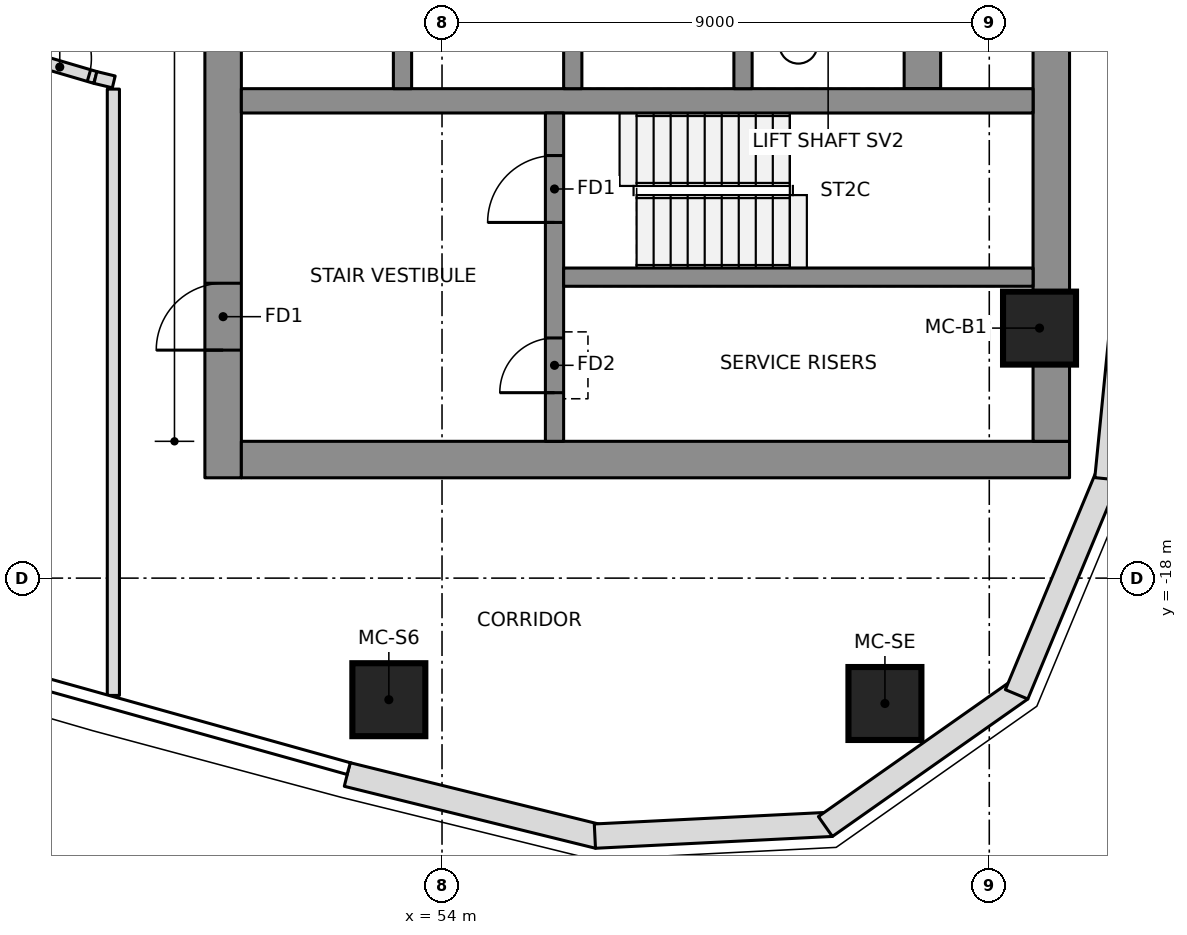
"""IFC4 building model, lengths in metres.
Left out: names, types, materials, properties, quantities, classifications, styles, units other than length and angle.
Written with IfcOpenShell. Run it as: python <this file> out.ifc"""

import sys

from ifc_helpers import new_model, si_unit, direction, frame, frame_2d, origin, origin_2d, place, context, subcontext, project, spatial, polyline, rectangle, outline, extrude, element, fill, save


model = new_model("IFC4")
c1 = context("Model", 3, precision=1e-05, world=origin(), true_north=direction((0.0, 1.0)))
c2 = subcontext(c1, "Body", "Model", "MODEL_VIEW")
j1 = project(units=[si_unit("LENGTHUNIT", "METRE"), si_unit("PLANEANGLEUNIT", "RADIAN")], contexts=[c1])
p1 = place(None, origin())
s1 = spatial("IfcSite", under=j1, at=p1, CompositionType="ELEMENT")
p2 = place(p1, origin())
s2 = spatial("IfcBuilding", under=s1, at=p2, CompositionType="ELEMENT")
p3 = place(p2, frame((0.0, 0.0, 224.35)))
s3 = spatial("IfcBuildingStorey", under=s2, at=p3, CompositionType="ELEMENT", Elevation=224.35)
p4 = place(p3, frame((50.4, -16.35, 0.0), z_axis=(0.0, 0.0, 1.0), x_axis=(0.0, 1.0, 0.0)))
e1 = element("IfcWall", 1, at=p4, inside=s3, PredefinedType="SHEAR", context=c2, shape_type="SweptSolid", body=[
    extrude(rectangle(XDim=9.7, YDim=0.6, at=frame_2d((4.85, 0.0))), origin(), (0.0, 0.0, 1.0), 3.55),
])
p5 = place(p4, frame((2.1, 0.0, 0.0)))
e2 = element("IfcOpeningElement", 2, at=p5, cuts=e1, PredefinedType="OPENING", context=c2, shape_type="SweptSolid", body=[
    extrude(rectangle(XDim=1.1, YDim=2.1, at=frame_2d((0.55, 1.05))), frame((0.0, 0.31, 0.0), z_axis=(0.0, -1.0, 0.0), x_axis=(1.0, 0.0, 0.0)), (0.0, 0.0, 1.0), 0.62),
])
p6 = place(p3, frame((50.7, -16.05, 0.0), z_axis=(0.0, 0.0, 1.0), x_axis=(1.0, 0.0, 0.0)))
e3 = element("IfcWall", 3, at=p6, inside=s3, PredefinedType="SHEAR", context=c2, shape_type="SweptSolid", body=[
    extrude(rectangle(XDim=13.62, YDim=0.6, at=frame_2d((6.81, 0.0))), origin(), (0.0, 0.0, 1.0), 3.55),
])
p7 = place(p3, frame((64.02, -15.75, 0.0), z_axis=(0.0, 0.0, 1.0), x_axis=(0.0, 1.0, 0.0)))
e4 = element("IfcWall", 4, at=p7, inside=s3, PredefinedType="SHEAR", context=c2, shape_type="SweptSolid", body=[
    extrude(rectangle(XDim=8.248, YDim=0.6, at=frame_2d((4.124, 0.0))), origin(), (0.0, 0.0, 1.0), 3.55),
])
p8 = place(p3, frame((61.9, -9.95, 0.0), z_axis=(0.0, 0.0, 1.0), x_axis=(0.0, 1.0, 0.0)))
e5 = element("IfcWall", 5, at=p8, inside=s3, PredefinedType="SHEAR", context=c2, shape_type="SweptSolid", body=[
    extrude(rectangle(XDim=19.9, YDim=0.6, at=frame_2d((9.95, 0.0))), origin(), (0.0, 0.0, 1.0), 3.55),
])
p9 = place(p3, frame((50.7, -10.15, 0.0), z_axis=(0.0, 0.0, 1.0), x_axis=(1.0, 0.0, 0.0)))
e6 = element("IfcWall", 6, at=p9, inside=s3, PredefinedType="SHEAR", context=c2, shape_type="SweptSolid", body=[
    extrude(rectangle(XDim=13.02, YDim=0.4, at=frame_2d((6.51, 0.0))), origin(), (0.0, 0.0, 1.0), 3.55),
])
for number, where, z_axis, x_axis in (
    (7, (53.35, -9.95, 0.0), (0.0, 0.0, 1.0), (0.0, 1.0, 0.0)),
    (8, (56.15, -9.95, 0.0), (0.0, 0.0, 1.0), (0.0, 1.0, 0.0)),
    (9, (58.95, -9.95, 0.0), (0.0, 0.0, 1.0), (0.0, 1.0, 0.0)),
):
    element("IfcWall", number, at=place(p3, frame(where, z_axis=z_axis, x_axis=x_axis)), inside=s3, PredefinedType="SHEAR", context=c2, shape_type="SweptSolid", body=[
        extrude(rectangle(XDim=3.0, YDim=0.3, at=frame_2d((1.5, 0.0))), origin(), (0.0, 0.0, 1.0), 3.55),
    ])
p10 = place(p3, frame((55.85, -15.75, 0.0), z_axis=(0.0, 0.0, 1.0), x_axis=(0.0, 1.0, 0.0)))
e10 = element("IfcWall", 10, at=p10, inside=s3, PredefinedType="SHEAR", context=c2, shape_type="SweptSolid", body=[
    extrude(rectangle(XDim=5.4, YDim=0.3, at=frame_2d((2.7, 0.0))), origin(), (0.0, 0.0, 1.0), 3.55),
])
p11 = place(p10, frame((3.6, 0.0, 0.0)))
e11 = element("IfcOpeningElement", 11, at=p11, cuts=e10, PredefinedType="OPENING", context=c2, shape_type="SweptSolid", body=[
    extrude(rectangle(XDim=1.1, YDim=2.1, at=frame_2d((0.55, 1.05))), frame((0.0, 0.16, 0.0), z_axis=(0.0, -1.0, 0.0), x_axis=(1.0, 0.0, 0.0)), (0.0, 0.0, 1.0), 0.32),
])
p12 = place(p10, frame((0.8, 0.0, 0.0)))
e12 = element("IfcOpeningElement", 12, at=p12, cuts=e10, PredefinedType="OPENING", context=c2, shape_type="SweptSolid", body=[
    extrude(rectangle(XDim=0.9, YDim=2.1, at=frame_2d((0.45, 1.05))), frame((0.0, 0.16, 0.0), z_axis=(0.0, -1.0, 0.0), x_axis=(1.0, 0.0, 0.0)), (0.0, 0.0, 1.0), 0.32),
])
p13 = place(p3, frame((56.0, -13.05, 0.0), z_axis=(0.0, 0.0, 1.0), x_axis=(1.0, 0.0, 0.0)))
e13 = element("IfcWall", 13, at=p13, inside=s3, PredefinedType="SHEAR", context=c2, shape_type="SweptSolid", body=[
    extrude(rectangle(XDim=7.72, YDim=0.3, at=frame_2d((3.86, 0.0))), origin(), (0.0, 0.0, 1.0), 3.55),
])
for number, where, z_axis, x_axis in (
    (14, (53.125, -20.0, 0.0), (0.0, 0.0, 1.0), (1.0, 0.0, 0.0)),
    (15, (61.284, -20.062, 0.0), (0.0, 0.0, 1.0), (1.0, 0.0, 0.0)),
    (16, (63.826, -13.888, 0.0), (0.0, 0.0, 1.0), (1.0, 0.0, 0.0)),
):
    element("IfcColumn", number, at=place(p3, frame(where, z_axis=z_axis, x_axis=x_axis)), inside=s3, PredefinedType="COLUMN", context=c2, shape_type="SweptSolid", body=[
        extrude(rectangle(XDim=1.2, YDim=1.2, at=origin_2d()), origin(), (0.0, 0.0, 1.0), 3.55),
    ])
p14 = place(p3, frame((52.441, -21.23, 0.0), z_axis=(0.0, 0.0, 1.0), x_axis=(0.970902342456, -0.23947576373, 0.0)))
e17 = element("IfcWall", 17, at=p14, inside=s3, PredefinedType="NOTDEFINED", context=c2, shape_type="SweptSolid", body=[
    extrude(outline(polyline([(0.0, -0.2), (4.255, -0.2), (4.197, 0.2), (0.0, 0.2), (0.0, -0.2)])), origin(), (0.0, 0.0, 1.0), 3.25),
])
p15 = place(p3, frame((56.543, -22.242, 0.0), z_axis=(0.0, 0.0, 1.0), x_axis=(0.998758875872, 0.049806705046, 0.0)))
e18 = element("IfcWall", 18, at=p15, inside=s3, PredefinedType="NOTDEFINED", context=c2, shape_type="SweptSolid", body=[
    extrude(outline(polyline([(-0.029, -0.2), (3.871, -0.2), (3.756, 0.2), (0.029, 0.2), (-0.029, -0.2)])), origin(), (0.0, 0.0, 1.0), 3.25),
])
p16 = place(p3, frame((60.352, -22.052, 0.0), z_axis=(0.0, 0.0, 1.0), x_axis=(0.817942545532, 0.575299915009, 0.0)))
e19 = element("IfcWall", 19, at=p16, inside=s3, PredefinedType="NOTDEFINED", context=c2, shape_type="SweptSolid", body=[
    extrude(outline(polyline([(-0.058, -0.2), (3.871, -0.2), (3.756, 0.2), (0.058, 0.2), (-0.058, -0.2)])), origin(), (0.0, 0.0, 1.0), 3.25),
])
p17 = place(p3, frame((63.471, -19.858, 0.0), z_axis=(0.0, 0.0, 1.0), x_axis=(0.3844335483, 0.923152667191, 0.0)))
e20 = element("IfcWall", 20, at=p17, inside=s3, PredefinedType="NOTDEFINED", context=c2, shape_type="SweptSolid", body=[
    extrude(outline(polyline([(-0.058, -0.2), (3.843, -0.2), (3.784, 0.2), (0.058, 0.2), (-0.058, -0.2)])), origin(), (0.0, 0.0, 1.0), 3.25),
])
p18 = place(p3, frame((64.938, -16.337, 0.0), z_axis=(0.0, 0.0, 1.0), x_axis=(0.098718218066, 0.995115427185, 0.0)))
e21 = element("IfcWall", 21, at=p18, inside=s3, PredefinedType="NOTDEFINED", context=c2, shape_type="SweptSolid", body=[
    extrude(outline(polyline([(-0.03, -0.2), (4.096, -0.2), (4.09, 0.2), (0.03, 0.2), (-0.03, -0.2)])), origin(), (0.0, 0.0, 1.0), 3.25),
])
p19 = place(p3, frame((46.85, -9.34, 0.0), z_axis=(0.0, 0.0, 1.0), x_axis=(0.95944263903, -0.281903924079, 0.0)))
e22 = element("IfcWall", 22, at=p19, inside=s3, PredefinedType="PARTITIONING", context=c2, shape_type="SweptSolid", body=[
    extrude(rectangle(XDim=1.511, YDim=0.2, at=frame_2d((0.756, 0.0))), origin(), (0.0, 0.0, 1.0), 3.25),
])
p20 = place(p19, frame((0.4, 0.0, 0.0)))
e23 = element("IfcOpeningElement", 23, at=p20, cuts=e22, PredefinedType="OPENING", context=c2, shape_type="SweptSolid", body=[
    extrude(rectangle(XDim=1.0, YDim=2.1, at=frame_2d((0.5, 1.05))), frame((0.0, 0.11, 0.0), z_axis=(0.0, -1.0, 0.0), x_axis=(1.0, 0.0, 0.0)), (0.0, 0.0, 1.0), 0.22),
])
p21 = place(p3, frame((48.3, -9.766, 0.0), z_axis=(0.0, 0.0, 1.0), x_axis=(0.972415906571, -0.233253734477, 0.0)))
e24 = element("IfcWall", 24, at=p21, inside=s3, PredefinedType="PARTITIONING", context=c2, shape_type="SweptSolid", body=[
    extrude(rectangle(XDim=0.31, YDim=0.2, at=frame_2d((0.155, 0.0))), origin(), (0.0, 0.0, 1.0), 3.25),
])
p22 = place(p3, frame((48.595, -9.957, 0.0), z_axis=(0.0, 0.0, 1.0), x_axis=(0.0, -1.0, 0.0)))
e25 = element("IfcWall", 25, at=p22, inside=s3, PredefinedType="PARTITIONING", context=c2, shape_type="SweptSolid", body=[
    extrude(rectangle(XDim=9.972, YDim=0.2, at=frame_2d((4.986, 0.0))), origin(), (0.0, 0.0, 1.0), 3.25),
])
p23 = place(p20, origin())
e26 = element("IfcDoor", 26, at=p23, inside=s3, OperationType="SINGLE_SWING_LEFT", PredefinedType="DOOR", context=c2, shape_type="SweptSolid", body=[
    extrude(rectangle(XDim=1.0, YDim=2.1, at=frame_2d((0.5, 1.05))), frame((0.0, 0.025, 0.0), z_axis=(0.0, -1.0, 0.0), x_axis=(1.0, 0.0, 0.0)), (0.0, 0.0, 1.0), 0.05),
])
fill(e23, e26)
p24 = place(p11, origin())
e27 = element("IfcDoor", 27, at=p24, inside=s3, OperationType="SINGLE_SWING_RIGHT", PredefinedType="DOOR", context=c2, shape_type="SweptSolid", body=[
    extrude(rectangle(XDim=1.1, YDim=2.1, at=frame_2d((0.55, 1.05))), frame((0.0, 0.025, 0.0), z_axis=(0.0, -1.0, 0.0), x_axis=(1.0, 0.0, 0.0)), (0.0, 0.0, 1.0), 0.05),
])
fill(e11, e27)
p25 = place(p5, origin())
e28 = element("IfcDoor", 28, at=p25, inside=s3, OperationType="SINGLE_SWING_RIGHT", PredefinedType="DOOR", context=c2, shape_type="SweptSolid", body=[
    extrude(rectangle(XDim=1.1, YDim=2.1, at=frame_2d((0.55, 1.05))), frame((0.0, 0.025, 0.0), z_axis=(0.0, -1.0, 0.0), x_axis=(1.0, 0.0, 0.0)), (0.0, 0.0, 1.0), 0.05),
])
fill(e2, e28)
p26 = place(p12, origin())
e29 = element("IfcDoor", 29, at=p26, inside=s3, OperationType="SINGLE_SWING_LEFT", PredefinedType="DOOR", context=c2, shape_type="SweptSolid", body=[
    extrude(rectangle(XDim=0.9, YDim=2.1, at=frame_2d((0.45, 1.05))), frame((0.0, 0.025, 0.0), z_axis=(0.0, -1.0, 0.0), x_axis=(1.0, 0.0, 0.0)), (0.0, 0.0, 1.0), 0.05),
])
fill(e12, e29)
save(model, sys.argv[1])
